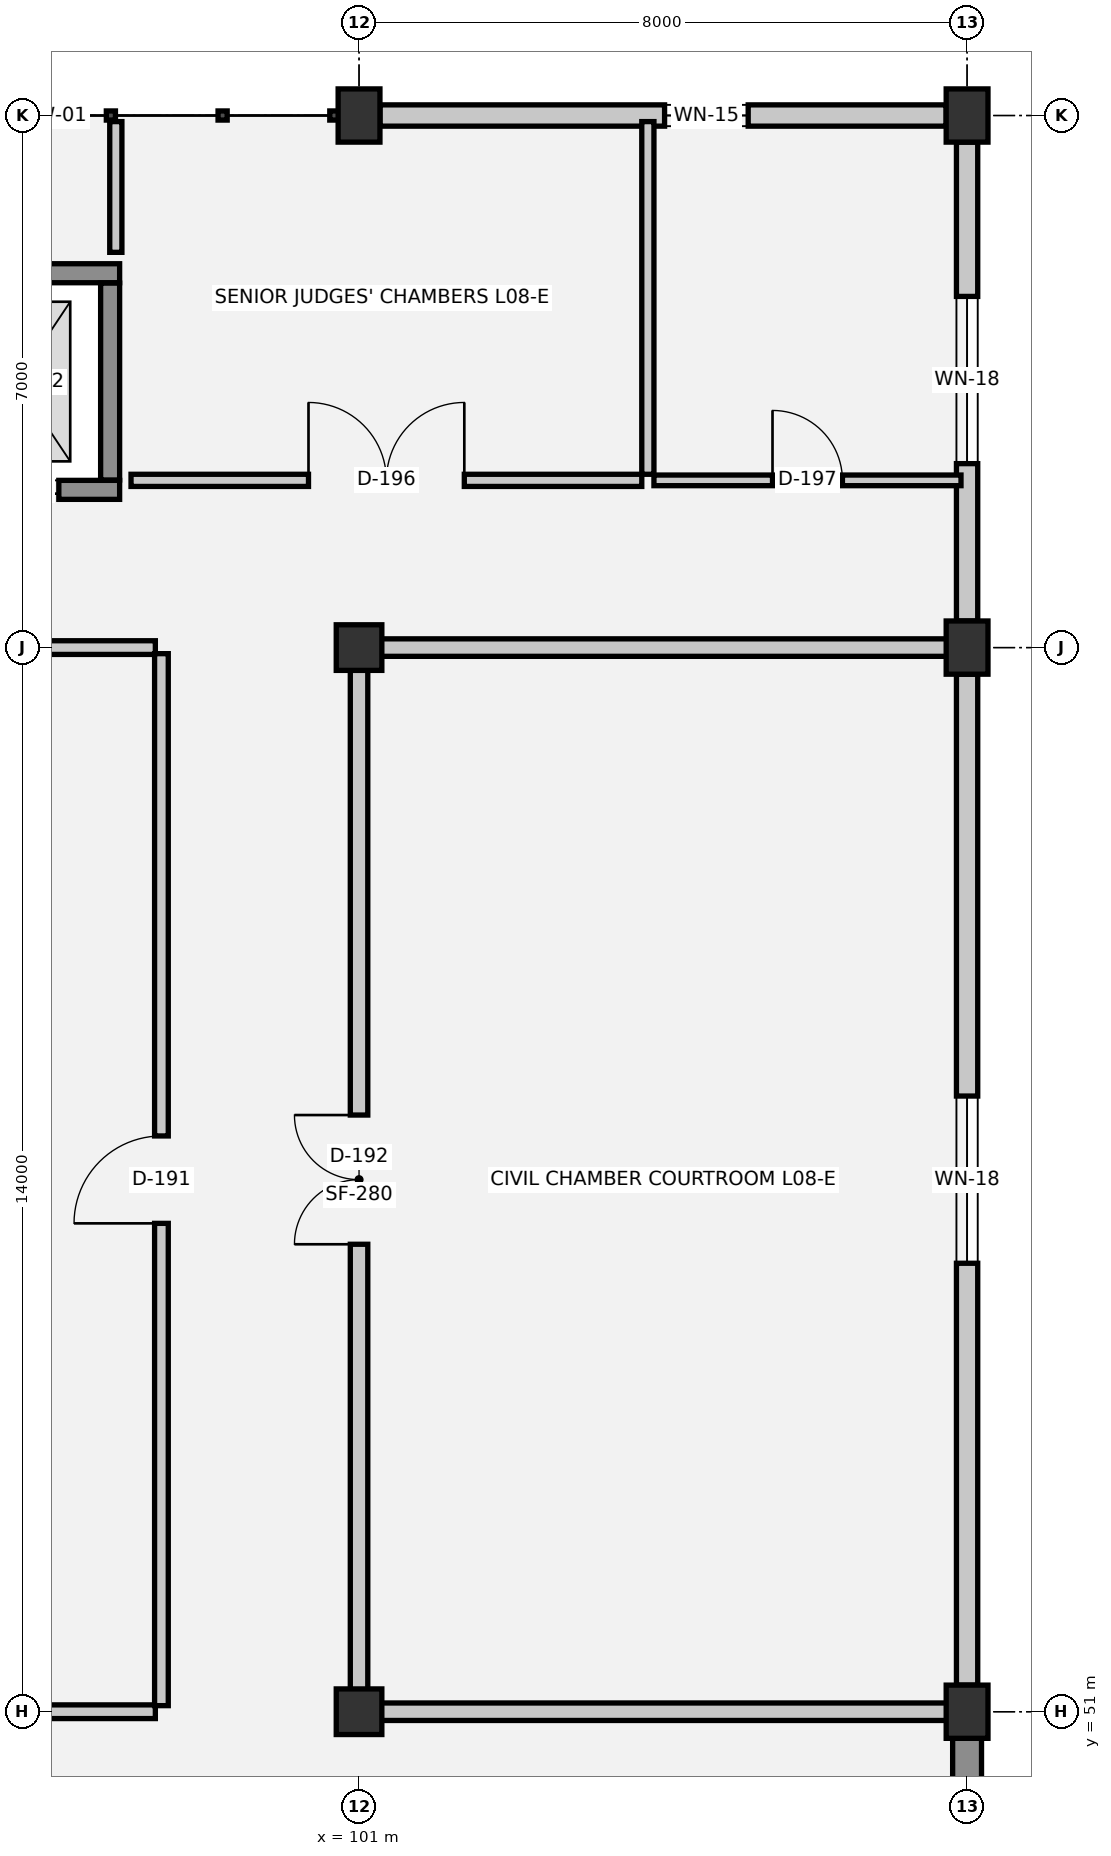
"""IFC4 building model, lengths in metres.
Left out: names, types, materials, properties, quantities, classifications, styles, units other than length and angle.
Written with IfcOpenShell. Run it as: python <this file> out.ifc"""

import sys

from ifc_helpers import new_model, si_unit, direction, frame, frame_2d, origin, origin_2d, place, context, subcontext, project, spatial, rectangle, extrude, element, fill, save


model = new_model("IFC4")
c1 = context("Model", 3, precision=1e-05, world=origin(), true_north=direction((0.0, 1.0)))
c2 = subcontext(c1, "Body", "Model", "MODEL_VIEW")
j1 = project(units=[si_unit("LENGTHUNIT", "METRE"), si_unit("PLANEANGLEUNIT", "RADIAN")], contexts=[c1])
p1 = place(None, origin())
s1 = spatial("IfcSite", under=j1, at=p1, CompositionType="ELEMENT")
p2 = place(p1, origin())
s2 = spatial("IfcBuilding", under=s1, at=p2, CompositionType="ELEMENT")
p3 = place(p2, frame((0.0, 0.0, 29.55)))
s3 = spatial("IfcBuildingStorey", under=s2, at=p3, CompositionType="ELEMENT", Elevation=29.55)
for number, where, z_axis, x_axis in (
    (1, (101.0, 51.0, 0.0), (0.0, 0.0, 1.0), (1.0, 0.0, 0.0)),
    (2, (101.0, 65.0, 0.0), (0.0, 0.0, 1.0), (1.0, 0.0, 0.0)),
):
    element("IfcColumn", number, at=place(p3, frame(where, z_axis=z_axis, x_axis=x_axis)), inside=s3, PredefinedType="COLUMN", context=c2, shape_type="SweptSolid", body=[
        extrude(rectangle(XDim=0.6, YDim=0.6, at=origin_2d()), origin(), (0.0, 0.0, 1.0), 3.75),
    ])
for number, where, z_axis, x_axis in (
    (3, (101.0, 72.0, 0.0), (0.0, 0.0, 1.0), (1.0, 0.0, 0.0)),
    (4, (109.0, 51.0, 0.0), (0.0, 0.0, 1.0), (1.0, 0.0, 0.0)),
    (5, (109.0, 65.0, 0.0), (0.0, 0.0, 1.0), (1.0, 0.0, 0.0)),
    (6, (109.0, 72.0, 0.0), (0.0, 0.0, 1.0), (1.0, 0.0, 0.0)),
):
    element("IfcColumn", number, at=place(p3, frame(where, z_axis=z_axis, x_axis=x_axis)), inside=s3, PredefinedType="COLUMN", context=c2, shape_type="SweptSolid", body=[
        extrude(rectangle(XDim=0.55, YDim=0.7, at=origin_2d()), origin(), (0.0, 0.0, 1.0), 3.75),
    ])
p4 = place(p3, frame((101.275, 72.0, 0.0), z_axis=(0.0, 0.0, 1.0), x_axis=(1.0, 0.0, 0.0)))
e7 = element("IfcWall", 7, at=p4, inside=s3, PredefinedType="SOLIDWALL", context=c2, shape_type="SweptSolid", body=[
    extrude(rectangle(XDim=7.45, YDim=0.28, at=frame_2d((3.725, 0.0))), origin(), (0.0, 0.0, 1.0), 2.56),
])
p5 = place(p4, frame((3.745, 0.0, 1.0)))
e8 = element("IfcOpeningElement", 8, at=p5, cuts=e7, PredefinedType="OPENING", context=c2, shape_type="SweptSolid", body=[
    extrude(rectangle(XDim=1.1, YDim=1.2, at=frame_2d((0.55, 0.6))), frame((0.0, 0.15, 0.0), z_axis=(0.0, -1.0, 0.0), x_axis=(1.0, 0.0, 0.0)), (0.0, 0.0, 1.0), 0.3),
])
p6 = place(p3, frame((109.0, 71.65, 0.0), z_axis=(0.0, 0.0, 1.0), x_axis=(0.0, -1.0, 0.0)))
e9 = element("IfcWall", 9, at=p6, inside=s3, PredefinedType="SOLIDWALL", context=c2, shape_type="SweptSolid", body=[
    extrude(rectangle(XDim=6.3, YDim=0.28, at=frame_2d((3.15, 0.0))), origin(), (0.0, 0.0, 1.0), 2.56),
])
p7 = place(p6, frame((2.03, 0.0, 0.9)))
e10 = element("IfcOpeningElement", 10, at=p7, cuts=e9, PredefinedType="OPENING", context=c2, shape_type="SweptSolid", body=[
    extrude(rectangle(XDim=2.2, YDim=1.0, at=frame_2d((1.1, 0.5))), frame((0.0, 0.15, 0.0), z_axis=(0.0, -1.0, 0.0), x_axis=(1.0, 0.0, 0.0)), (0.0, 0.0, 1.0), 0.3),
])
p8 = place(p3, frame((109.0, 64.65, 0.0), z_axis=(0.0, 0.0, 1.0), x_axis=(0.0, -1.0, 0.0)))
e11 = element("IfcWall", 11, at=p8, inside=s3, PredefinedType="SOLIDWALL", context=c2, shape_type="SweptSolid", body=[
    extrude(rectangle(XDim=13.3, YDim=0.28, at=frame_2d((6.65, 0.0))), origin(), (0.0, 0.0, 1.0), 2.56),
])
p9 = place(p8, frame((5.55, 0.0, 0.9)))
e12 = element("IfcOpeningElement", 12, at=p9, cuts=e11, PredefinedType="OPENING", context=c2, shape_type="SweptSolid", body=[
    extrude(rectangle(XDim=2.2, YDim=1.0, at=frame_2d((1.1, 0.5))), frame((0.0, 0.15, 0.0), z_axis=(0.0, -1.0, 0.0), x_axis=(1.0, 0.0, 0.0)), (0.0, 0.0, 1.0), 0.3),
])
p10 = place(p3, frame((109.0, 50.65, 0.0), z_axis=(0.0, 0.0, 1.0), x_axis=(0.0, -1.0, 0.0)))
e13 = element("IfcWall", 13, at=p10, inside=s3, PredefinedType="STANDARD", context=c2, shape_type="SweptSolid", body=[
    extrude(rectangle(XDim=6.3, YDim=0.38, at=frame_2d((3.15, 0.0))), origin(), (0.0, 0.0, 1.0), 2.56),
])
p11 = place(p3, frame((95.15, 67.075, 0.0), z_axis=(0.0, 0.0, 1.0), x_axis=(1.0, 0.0, 0.0)))
e14 = element("IfcWall", 14, at=p11, inside=s3, PredefinedType="SHEAR", context=c2, shape_type="SweptSolid", body=[
    extrude(rectangle(XDim=2.7, YDim=0.25, at=frame_2d((1.35, 0.0))), origin(), (0.0, 0.0, 1.0), 3.75),
])
p12 = place(p11, frame((0.8, 0.0, 0.0)))
e15 = element("IfcOpeningElement", 15, at=p12, cuts=e14, PredefinedType="OPENING", context=c2, shape_type="SweptSolid", body=[
    extrude(rectangle(XDim=1.1, YDim=2.15, at=frame_2d((0.55, 1.075))), frame((0.0, 0.135, 0.0), z_axis=(0.0, -1.0, 0.0), x_axis=(1.0, 0.0, 0.0)), (0.0, 0.0, 1.0), 0.27),
])
p13 = place(p3, frame((97.85, 69.925, 0.0), z_axis=(0.0, 0.0, 1.0), x_axis=(-1.0, 0.0, 0.0)))
e16 = element("IfcWall", 16, at=p13, inside=s3, PredefinedType="SHEAR", context=c2, shape_type="SweptSolid", body=[
    extrude(rectangle(XDim=2.7, YDim=0.25, at=frame_2d((1.35, 0.0))), origin(), (0.0, 0.0, 1.0), 3.75),
])
p14 = place(p3, frame((97.725, 67.205, 0.0), z_axis=(0.0, 0.0, 1.0), x_axis=(0.0, 1.0, 0.0)))
e17 = element("IfcWall", 17, at=p14, inside=s3, PredefinedType="SHEAR", context=c2, shape_type="SweptSolid", body=[
    extrude(rectangle(XDim=2.59, YDim=0.25, at=frame_2d((1.295, 0.0))), origin(), (0.0, 0.0, 1.0), 3.75),
])
p15 = place(p3, frame((89.92, 51.0, 0.0), z_axis=(0.0, 0.0, 1.0), x_axis=(1.0, 0.0, 0.0)))
e18 = element("IfcWall", 18, at=p15, inside=s3, PredefinedType="PARTITIONING", context=c2, shape_type="SweptSolid", body=[
    extrude(rectangle(XDim=8.4, YDim=0.18, at=frame_2d((4.2, 0.0))), origin(), (0.0, 0.0, 1.0), 2.78),
])
p16 = place(p3, frame((101.08, 51.0, 0.0), z_axis=(0.0, 0.0, 1.0), x_axis=(1.0, 0.0, 0.0)))
e19 = element("IfcWall", 19, at=p16, inside=s3, PredefinedType="PARTITIONING", context=c2, shape_type="SweptSolid", body=[
    extrude(rectangle(XDim=7.84, YDim=0.23, at=frame_2d((3.92, 0.0))), origin(), (0.0, 0.0, 1.0), 2.78),
])
p17 = place(p3, frame((89.92, 65.0, 0.0), z_axis=(0.0, 0.0, 1.0), x_axis=(1.0, 0.0, 0.0)))
e20 = element("IfcWall", 20, at=p17, inside=s3, PredefinedType="PARTITIONING", context=c2, shape_type="SweptSolid", body=[
    extrude(rectangle(XDim=8.4, YDim=0.18, at=frame_2d((4.2, 0.0))), origin(), (0.0, 0.0, 1.0), 2.78),
])
p18 = place(p3, frame((101.08, 65.0, 0.0), z_axis=(0.0, 0.0, 1.0), x_axis=(1.0, 0.0, 0.0)))
e21 = element("IfcWall", 21, at=p18, inside=s3, PredefinedType="PARTITIONING", context=c2, shape_type="SweptSolid", body=[
    extrude(rectangle(XDim=7.84, YDim=0.23, at=frame_2d((3.92, 0.0))), origin(), (0.0, 0.0, 1.0), 2.78),
])
p19 = place(p3, frame((98.0, 67.2, 0.0), z_axis=(0.0, 0.0, 1.0), x_axis=(1.0, 0.0, 0.0)))
e22 = element("IfcWall", 22, at=p19, inside=s3, PredefinedType="PARTITIONING", context=c2, shape_type="SweptSolid", body=[
    extrude(rectangle(XDim=6.72, YDim=0.16, at=frame_2d((3.36, 0.0))), origin(), (0.0, 0.0, 1.0), 3.39),
])
p20 = place(p19, frame((2.335, 0.0, 0.0)))
e23 = element("IfcOpeningElement", 23, at=p20, cuts=e22, PredefinedType="OPENING", context=c2, shape_type="SweptSolid", body=[
    extrude(rectangle(XDim=2.05, YDim=2.35, at=frame_2d((1.025, 1.175))), frame((0.0, 0.09, 0.0), z_axis=(0.0, -1.0, 0.0), x_axis=(1.0, 0.0, 0.0)), (0.0, 0.0, 1.0), 0.18),
])
p21 = place(p3, frame((104.88, 67.2, 0.0), z_axis=(0.0, 0.0, 1.0), x_axis=(1.0, 0.0, 0.0)))
e24 = element("IfcWall", 24, at=p21, inside=s3, PredefinedType="PLUMBINGWALL", context=c2, shape_type="SweptSolid", body=[
    extrude(rectangle(XDim=4.04, YDim=0.14, at=frame_2d((2.02, 0.0))), origin(), (0.0, 0.0, 1.0), 3.39),
])
p22 = place(p21, frame((1.56, 0.0, 0.0)))
e25 = element("IfcOpeningElement", 25, at=p22, cuts=e24, PredefinedType="OPENING", context=c2, shape_type="SweptSolid", body=[
    extrude(rectangle(XDim=0.92, YDim=2.1, at=frame_2d((0.46, 1.05))), frame((0.0, 0.08, 0.0), z_axis=(0.0, -1.0, 0.0), x_axis=(1.0, 0.0, 0.0)), (0.0, 0.0, 1.0), 0.16),
])
p23 = place(p3, frame((97.8, 70.2, 0.0), z_axis=(0.0, 0.0, 1.0), x_axis=(0.0, 1.0, 0.0)))
e26 = element("IfcWall", 26, at=p23, inside=s3, PredefinedType="PARTITIONING", context=c2, shape_type="SweptSolid", body=[
    extrude(rectangle(XDim=1.72, YDim=0.16, at=frame_2d((0.86, 0.0))), origin(), (0.0, 0.0, 1.0), 3.39),
])
p24 = place(p3, frame((98.4, 51.08, 0.0), z_axis=(0.0, 0.0, 1.0), x_axis=(0.0, 1.0, 0.0)))
e27 = element("IfcWall", 27, at=p24, inside=s3, PredefinedType="PARTITIONING", context=c2, shape_type="SweptSolid", body=[
    extrude(rectangle(XDim=13.84, YDim=0.18, at=frame_2d((6.92, 0.0))), origin(), (0.0, 0.0, 1.0), 3.39),
])
p25 = place(p24, frame((6.345, 0.0, 0.0)))
e28 = element("IfcOpeningElement", 28, at=p25, cuts=e27, PredefinedType="OPENING", context=c2, shape_type="SweptSolid", body=[
    extrude(rectangle(XDim=1.15, YDim=2.2, at=frame_2d((0.575, 1.1))), frame((0.0, 0.1, 0.0), z_axis=(0.0, -1.0, 0.0), x_axis=(1.0, 0.0, 0.0)), (0.0, 0.0, 1.0), 0.2),
])
p26 = place(p3, frame((101.0, 51.08, 0.0), z_axis=(0.0, 0.0, 1.0), x_axis=(0.0, 1.0, 0.0)))
e29 = element("IfcWall", 29, at=p26, inside=s3, PredefinedType="PARTITIONING", context=c2, shape_type="SweptSolid", body=[
    extrude(rectangle(XDim=13.84, YDim=0.23, at=frame_2d((6.92, 0.0))), origin(), (0.0, 0.0, 1.0), 2.58),
])
p27 = place(p26, frame((6.07, 0.0, 0.0)))
e30 = element("IfcOpeningElement", 30, at=p27, cuts=e29, PredefinedType="OPENING", context=c2, shape_type="SweptSolid", body=[
    extrude(rectangle(XDim=1.7, YDim=2.3, at=frame_2d((0.85, 1.15))), frame((0.0, 0.125, 0.0), z_axis=(0.0, -1.0, 0.0), x_axis=(1.0, 0.0, 0.0)), (0.0, 0.0, 1.0), 0.25),
])
p28 = place(p3, frame((104.8, 67.28, 0.0), z_axis=(0.0, 0.0, 1.0), x_axis=(0.0, 1.0, 0.0)))
e31 = element("IfcWall", 31, at=p28, inside=s3, PredefinedType="PARTITIONING", context=c2, shape_type="SweptSolid", body=[
    extrude(rectangle(XDim=4.64, YDim=0.16, at=frame_2d((2.32, 0.0))), origin(), (0.0, 0.0, 1.0), 3.39),
])
p29 = place(p5, origin())
e32 = element("IfcWindow", 32, at=p29, inside=s3, PartitioningType="SINGLE_PANEL", PredefinedType="WINDOW", context=c2, shape_type="SweptSolid", body=[
    extrude(rectangle(XDim=1.1, YDim=1.2, at=frame_2d((0.55, 0.6))), frame((0.0, 0.03, 0.0), z_axis=(0.0, -1.0, 0.0), x_axis=(1.0, 0.0, 0.0)), (0.0, 0.0, 1.0), 0.06),
])
fill(e8, e32)
p30 = place(p7, origin())
e33 = element("IfcWindow", 33, at=p30, inside=s3, PartitioningType="SINGLE_PANEL", PredefinedType="WINDOW", context=c2, shape_type="SweptSolid", body=[
    extrude(rectangle(XDim=2.2, YDim=1.0, at=frame_2d((1.1, 0.5))), frame((0.0, 0.03, 0.0), z_axis=(0.0, -1.0, 0.0), x_axis=(1.0, 0.0, 0.0)), (0.0, 0.0, 1.0), 0.06),
])
fill(e10, e33)
p31 = place(p9, origin())
e34 = element("IfcWindow", 34, at=p31, inside=s3, PartitioningType="SINGLE_PANEL", PredefinedType="WINDOW", context=c2, shape_type="SweptSolid", body=[
    extrude(rectangle(XDim=2.2, YDim=1.0, at=frame_2d((1.1, 0.5))), frame((0.0, 0.03, 0.0), z_axis=(0.0, -1.0, 0.0), x_axis=(1.0, 0.0, 0.0)), (0.0, 0.0, 1.0), 0.06),
])
fill(e12, e34)
p32 = place(p12, origin())
e35 = element("IfcDoor", 35, at=p32, inside=s3, OperationType="DOUBLE_DOOR_SLIDING", PredefinedType="DOOR", context=c2, shape_type="SweptSolid", body=[
    extrude(rectangle(XDim=1.1, YDim=2.15, at=frame_2d((0.55, 1.075))), frame((0.0, 0.025, 0.0), z_axis=(0.0, -1.0, 0.0), x_axis=(1.0, 0.0, 0.0)), (0.0, 0.0, 1.0), 0.05),
])
fill(e15, e35)
p33 = place(p25, origin())
e36 = element("IfcDoor", 36, at=p33, inside=s3, OperationType="SINGLE_SWING_LEFT", PredefinedType="DOOR", context=c2, shape_type="SweptSolid", body=[
    extrude(rectangle(XDim=1.15, YDim=2.2, at=frame_2d((0.575, 1.1))), frame((0.0, 0.025, 0.0), z_axis=(0.0, -1.0, 0.0), x_axis=(1.0, 0.0, 0.0)), (0.0, 0.0, 1.0), 0.05),
])
fill(e28, e36)
p34 = place(p27, origin())
e37 = element("IfcDoor", 37, at=p34, inside=s3, OperationType="DOUBLE_DOOR_SINGLE_SWING", PredefinedType="DOOR", context=c2, shape_type="SweptSolid", body=[
    extrude(rectangle(XDim=1.7, YDim=2.3, at=frame_2d((0.85, 1.15))), frame((0.0, 0.025, 0.0), z_axis=(0.0, -1.0, 0.0), x_axis=(1.0, 0.0, 0.0)), (0.0, 0.0, 1.0), 0.05),
])
fill(e30, e37)
p35 = place(p20, origin())
e38 = element("IfcDoor", 38, at=p35, inside=s3, OperationType="DOUBLE_DOOR_SINGLE_SWING", PredefinedType="DOOR", context=c2, shape_type="SweptSolid", body=[
    extrude(rectangle(XDim=2.05, YDim=2.35, at=frame_2d((1.025, 1.175))), frame((0.0, 0.025, 0.0), z_axis=(0.0, -1.0, 0.0), x_axis=(1.0, 0.0, 0.0)), (0.0, 0.0, 1.0), 0.05),
])
fill(e23, e38)
p36 = place(p22, origin())
e39 = element("IfcDoor", 39, at=p36, inside=s3, OperationType="SINGLE_SWING_LEFT", PredefinedType="DOOR", context=c2, shape_type="SweptSolid", body=[
    extrude(rectangle(XDim=0.92, YDim=2.1, at=frame_2d((0.46, 1.05))), frame((0.0, 0.025, 0.0), z_axis=(0.0, -1.0, 0.0), x_axis=(1.0, 0.0, 0.0)), (0.0, 0.0, 1.0), 0.05),
])
fill(e25, e39)
save(model, sys.argv[1])
